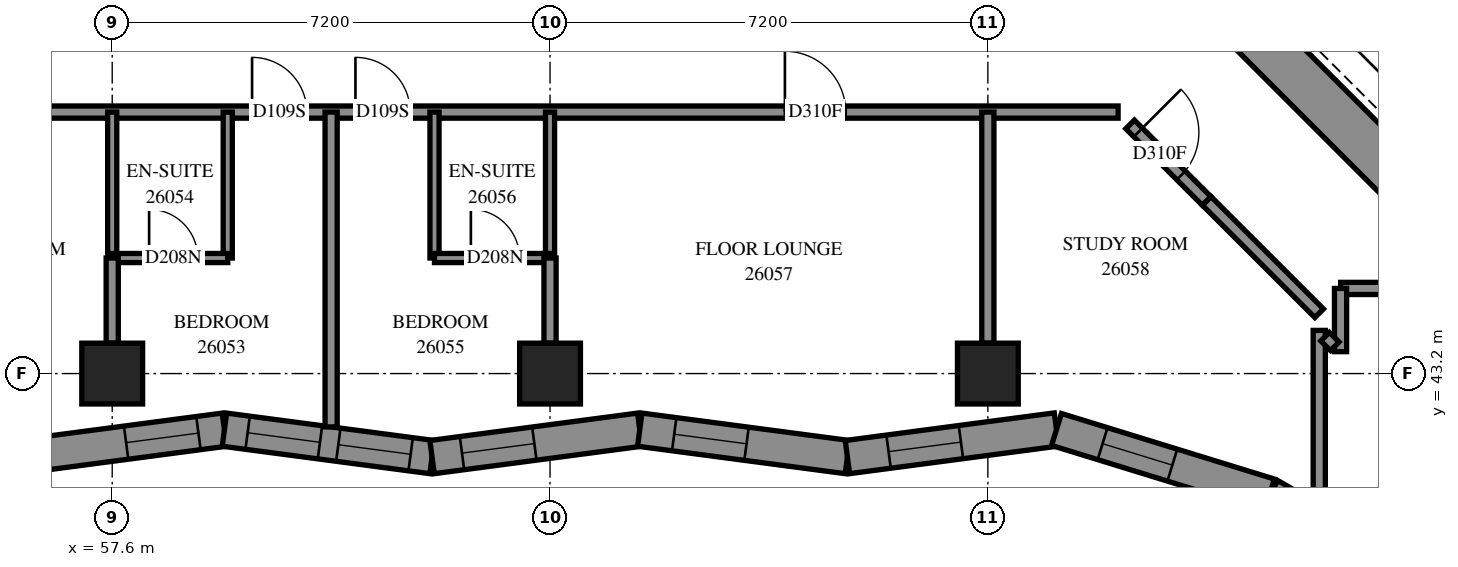
"""IFC4 building model, lengths in metres.
Left out: names, types, materials, properties, quantities, classifications, styles, units other than length and angle.
Written with IfcOpenShell. Run it as: python <this file> out.ifc"""

import sys

from ifc_helpers import new_model, si_unit, direction, frame, frame_2d, origin, origin_2d, place, context, subcontext, project, spatial, polyline, rectangle, outline, extrude, element, fill, save


model = new_model("IFC4")
c1 = context("Model", 3, precision=1e-05, world=origin(), true_north=direction((0.0, 1.0)))
c2 = subcontext(c1, "Body", "Model", "MODEL_VIEW")
j1 = project(units=[si_unit("LENGTHUNIT", "METRE"), si_unit("PLANEANGLEUNIT", "RADIAN")], contexts=[c1])
p1 = place(None, origin())
s1 = spatial("IfcSite", under=j1, at=p1, CompositionType="ELEMENT")
p2 = place(p1, origin())
s2 = spatial("IfcBuilding", under=s1, at=p2, CompositionType="ELEMENT")
p3 = place(p2, frame((0.0, 0.0, 98.2)))
s3 = spatial("IfcBuildingStorey", under=s2, at=p3, CompositionType="ELEMENT", Elevation=98.2)
for number, where, z_axis, x_axis in (
    (1, (57.6, 43.2, 0.0), (0.0, 0.0, 1.0), (1.0, 0.0, 0.0)),
    (2, (64.8, 43.2, 0.0), (0.0, 0.0, 1.0), (1.0, 0.0, 0.0)),
    (3, (72.0, 43.2, 0.0), (0.0, 0.0, 1.0), (1.0, 0.0, 0.0)),
):
    element("IfcColumn", number, at=place(p3, frame(where, z_axis=z_axis, x_axis=x_axis)), inside=s3, PredefinedType="COLUMN", context=c2, shape_type="SweptSolid", body=[
        extrude(rectangle(XDim=1.0, YDim=1.0, at=origin_2d()), origin(), (0.0, 0.0, 1.0), 3.1),
    ])
p4 = place(p3, frame((75.806, 49.373, -0.3), z_axis=(0.0, 0.0, 1.0), x_axis=(0.7071067812, -0.7071067812, 0.0)))
e4 = element("IfcWall", 4, at=p4, inside=s3, PredefinedType="SHEAR", context=c2, shape_type="SweptSolid", body=[
    extrude(rectangle(XDim=16.0, YDim=0.8, at=frame_2d((8.0, 0.0))), origin(), (0.0, 0.0, 1.0), 2.7),
])
p5 = place(p3, frame((56.03, 41.826, 0.0), z_axis=(0.0, 0.0, 1.0), x_axis=(0.9913924297, 0.1309238341, 0.0)))
e5 = element("IfcWall", 5, at=p5, inside=s3, PredefinedType="SOLIDWALL", context=c2, shape_type="SweptSolid", body=[
    extrude(outline(polyline([(-0.036, -0.275), (3.408, -0.275), (3.481, 0.275), (0.036, 0.275), (-0.036, -0.275)])), origin(), (0.0, 0.0, 1.0), 3.1),
])
p6 = place(p5, frame((1.814, 0.0, 0.5)))
e6 = element("IfcOpeningElement", 6, at=p6, cuts=e5, PredefinedType="OPENING", context=c2, shape_type="SweptSolid", body=[
    extrude(rectangle(XDim=1.2, YDim=2.45, at=frame_2d((0.6, 1.225))), frame((0.0, 0.285, 0.0), z_axis=(0.0, -1.0, 0.0), x_axis=(1.0, 0.0, 0.0)), (0.0, 0.0, 1.0), 0.57),
])
p7 = place(p3, frame((59.445, 42.277, 0.0), z_axis=(0.0, 0.0, 1.0), x_axis=(0.9913924297, -0.1309238341, 0.0)))
e7 = element("IfcWall", 7, at=p7, inside=s3, PredefinedType="SOLIDWALL", context=c2, shape_type="SweptSolid", body=[
    extrude(outline(polyline([(0.036, -0.275), (3.481, -0.275), (3.408, 0.275), (-0.036, 0.275), (0.036, -0.275)])), origin(), (0.0, 0.0, 1.0), 3.1),
])
p8 = place(p7, frame((0.385, 0.0, 0.5)))
e8 = element("IfcOpeningElement", 8, at=p8, cuts=e7, PredefinedType="OPENING", context=c2, shape_type="SweptSolid", body=[
    extrude(rectangle(XDim=1.2, YDim=2.45, at=frame_2d((0.6, 1.225))), frame((0.0, 0.285, 0.0), z_axis=(0.0, -1.0, 0.0), x_axis=(1.0, 0.0, 0.0)), (0.0, 0.0, 1.0), 0.57),
])
p9 = place(p7, frame((1.889, 0.0, 0.5)))
e9 = element("IfcOpeningElement", 9, at=p9, cuts=e7, PredefinedType="OPENING", context=c2, shape_type="SweptSolid", body=[
    extrude(rectangle(XDim=1.2, YDim=2.45, at=frame_2d((0.6, 1.225))), frame((0.0, 0.285, 0.0), z_axis=(0.0, -1.0, 0.0), x_axis=(1.0, 0.0, 0.0)), (0.0, 0.0, 1.0), 0.57),
])
p10 = place(p3, frame((62.86, 41.826, 0.0), z_axis=(0.0, 0.0, 1.0), x_axis=(0.9913924297, 0.1309238341, 0.0)))
e10 = element("IfcWall", 10, at=p10, inside=s3, PredefinedType="SOLIDWALL", context=c2, shape_type="SweptSolid", body=[
    extrude(outline(polyline([(-0.036, -0.275), (3.408, -0.275), (3.481, 0.275), (0.036, 0.275), (-0.036, -0.275)])), origin(), (0.0, 0.0, 1.0), 3.1),
])
p11 = place(p10, frame((0.496, 0.0, 0.5)))
e11 = element("IfcOpeningElement", 11, at=p11, cuts=e10, PredefinedType="OPENING", context=c2, shape_type="SweptSolid", body=[
    extrude(rectangle(XDim=1.2, YDim=2.45, at=frame_2d((0.6, 1.225))), frame((0.0, 0.285, 0.0), z_axis=(0.0, -1.0, 0.0), x_axis=(1.0, 0.0, 0.0)), (0.0, 0.0, 1.0), 0.57),
])
p12 = place(p3, frame((66.275, 42.277, 0.0), z_axis=(0.0, 0.0, 1.0), x_axis=(0.9913919321, -0.1309276022, 0.0)))
e12 = element("IfcWall", 12, at=p12, inside=s3, PredefinedType="SOLIDWALL", context=c2, shape_type="SweptSolid", body=[
    extrude(outline(polyline([(0.036, -0.275), (3.481, -0.275), (3.408, 0.275), (-0.036, 0.275), (0.036, -0.275)])), origin(), (0.0, 0.0, 1.0), 3.1),
])
p13 = place(p12, frame((0.572, 0.0, 0.5)))
e13 = element("IfcOpeningElement", 13, at=p13, cuts=e12, PredefinedType="OPENING", context=c2, shape_type="SweptSolid", body=[
    extrude(rectangle(XDim=1.2, YDim=2.45, at=frame_2d((0.6, 1.225))), frame((0.0, 0.285, 0.0), z_axis=(0.0, -1.0, 0.0), x_axis=(1.0, 0.0, 0.0)), (0.0, 0.0, 1.0), 0.57),
])
p14 = place(p3, frame((69.69, 41.826, 0.0), z_axis=(0.0, 0.0, 1.0), x_axis=(0.9913925578, 0.1309228641, 0.0)))
e14 = element("IfcWall", 14, at=p14, inside=s3, PredefinedType="SOLIDWALL", context=c2, shape_type="SweptSolid", body=[
    extrude(outline(polyline([(-0.036, -0.275), (3.408, -0.275), (3.529, 0.275), (0.036, 0.275), (-0.036, -0.275)])), origin(), (0.0, 0.0, 1.0), 3.1),
])
p15 = place(p14, frame((0.683, 0.0, 0.5)))
e15 = element("IfcOpeningElement", 15, at=p15, cuts=e14, PredefinedType="OPENING", context=c2, shape_type="SweptSolid", body=[
    extrude(rectangle(XDim=1.2, YDim=2.45, at=frame_2d((0.6, 1.225))), frame((0.0, 0.285, 0.0), z_axis=(0.0, -1.0, 0.0), x_axis=(1.0, 0.0, 0.0)), (0.0, 0.0, 1.0), 0.57),
])
p16 = place(p3, frame((73.129, 42.281, 0.0), z_axis=(0.0, 0.0, 1.0), x_axis=(0.9557583549, -0.2941529654, 0.0)))
e16 = element("IfcWall", 16, at=p16, inside=s3, PredefinedType="SOLIDWALL", context=c2, shape_type="SweptSolid", body=[
    extrude(outline(polyline([(0.06, -0.275), (3.633, -0.275), (3.696, 0.275), (-0.06, 0.275), (0.06, -0.275)])), origin(), (0.0, 0.0, 1.0), 3.1),
])
p17 = place(p16, frame((0.793, 0.0, 0.5)))
e17 = element("IfcOpeningElement", 17, at=p17, cuts=e16, PredefinedType="OPENING", context=c2, shape_type="SweptSolid", body=[
    extrude(rectangle(XDim=1.2, YDim=2.45, at=frame_2d((0.6, 1.225))), frame((0.0, 0.285, 0.0), z_axis=(0.0, -1.0, 0.0), x_axis=(1.0, 0.0, 0.0)), (0.0, 0.0, 1.0), 0.57),
])
p18 = place(p3, frame((76.631, 41.203, 0.0), z_axis=(0.0, 0.0, 1.0), x_axis=(0.8653939422, -0.501092132, 0.0)))
e18 = element("IfcWall", 18, at=p18, inside=s3, PredefinedType="SOLIDWALL", context=c2, shape_type="SweptSolid", body=[
    extrude(outline(polyline([(0.031, -0.275), (4.111, -0.275), (4.215, 0.275), (-0.031, 0.275), (0.031, -0.275)])), origin(), (0.0, 0.0, 1.0), 3.1),
])
p19 = place(p18, frame((0.348, 0.0, 0.5)))
e19 = element("IfcOpeningElement", 19, at=p19, cuts=e18, PredefinedType="OPENING", context=c2, shape_type="SweptSolid", body=[
    extrude(rectangle(XDim=1.2, YDim=2.45, at=frame_2d((0.6, 1.225))), frame((0.0, 0.285, 0.0), z_axis=(0.0, -1.0, 0.0), x_axis=(1.0, 0.0, 0.0)), (0.0, 0.0, 1.0), 0.57),
])
p20 = place(p18, frame((2.23, 0.0, 0.5)))
e20 = element("IfcOpeningElement", 20, at=p20, cuts=e18, PredefinedType="OPENING", context=c2, shape_type="SweptSolid", body=[
    extrude(rectangle(XDim=1.2, YDim=2.45, at=frame_2d((0.6, 1.225))), frame((0.0, 0.285, 0.0), z_axis=(0.0, -1.0, 0.0), x_axis=(1.0, 0.0, 0.0)), (0.0, 0.0, 1.0), 0.57),
])
p21 = place(p3, frame((54.7, 47.5, 0.0), z_axis=(0.0, 0.0, 1.0), x_axis=(1.0, 0.0, 0.0)))
e21 = element("IfcWall", 21, at=p21, inside=s3, PredefinedType="PARTITIONING", context=c2, shape_type="SweptSolid", body=[
    extrude(rectangle(XDim=19.442, YDim=0.2, at=frame_2d((9.721, 0.0))), origin(), (0.0, 0.0, 1.0), 3.1),
])
p22 = place(p21, frame((5.2, 0.0, 0.0)))
e22 = element("IfcOpeningElement", 22, at=p22, cuts=e21, PredefinedType="OPENING", context=c2, shape_type="SweptSolid", body=[
    extrude(rectangle(XDim=0.9, YDim=2.1, at=frame_2d((0.45, 1.05))), frame((0.0, 0.11, 0.0), z_axis=(0.0, -1.0, 0.0), x_axis=(1.0, 0.0, 0.0)), (0.0, 0.0, 1.0), 0.22),
])
p23 = place(p21, frame((6.9, 0.0, 0.0)))
e23 = element("IfcOpeningElement", 23, at=p23, cuts=e21, PredefinedType="OPENING", context=c2, shape_type="SweptSolid", body=[
    extrude(rectangle(XDim=0.9, YDim=2.1, at=frame_2d((0.45, 1.05))), frame((0.0, 0.11, 0.0), z_axis=(0.0, -1.0, 0.0), x_axis=(1.0, 0.0, 0.0)), (0.0, 0.0, 1.0), 0.22),
])
p24 = place(p21, frame((13.963, 0.0, 0.0)))
e24 = element("IfcOpeningElement", 24, at=p24, cuts=e21, PredefinedType="OPENING", context=c2, shape_type="SweptSolid", body=[
    extrude(rectangle(XDim=1.0, YDim=2.1, at=frame_2d((0.5, 1.05))), frame((0.0, 0.11, 0.0), z_axis=(0.0, -1.0, 0.0), x_axis=(1.0, 0.0, 0.0)), (0.0, 0.0, 1.0), 0.22),
])
p25 = place(p3, frame((61.2, 42.323, 0.0), z_axis=(0.0, 0.0, 1.0), x_axis=(0.0, 1.0, 0.0)))
e25 = element("IfcWall", 25, at=p25, inside=s3, PredefinedType="PARTITIONING", context=c2, shape_type="SweptSolid", body=[
    extrude(rectangle(XDim=5.177, YDim=0.2, at=frame_2d((2.588, 0.0))), origin(), (0.0, 0.0, 1.0), 3.1),
])
p26 = place(p3, frame((72.0, 43.7, 0.0), z_axis=(0.0, 0.0, 1.0), x_axis=(0.0, 1.0, 0.0)))
e26 = element("IfcWall", 26, at=p26, inside=s3, PredefinedType="PARTITIONING", context=c2, shape_type="SweptSolid", body=[
    extrude(rectangle(XDim=3.8, YDim=0.2, at=frame_2d((1.9, 0.0))), origin(), (0.0, 0.0, 1.0), 3.1),
])
p27 = place(p3, frame((77.45, 41.046, 0.0), z_axis=(0.0, 0.0, 1.0), x_axis=(0.0, 1.0, 0.0)))
e27 = element("IfcWall", 27, at=p27, inside=s3, PredefinedType="PARTITIONING", context=c2, shape_type="SweptSolid", body=[
    extrude(rectangle(XDim=2.864, YDim=0.2, at=frame_2d((1.432, 0.0))), origin(), (0.0, 0.0, 1.0), 3.1),
])
p28 = place(p3, frame((75.598, 46.04, 0.0), z_axis=(0.0, 0.0, 1.0), x_axis=(0.7074891043, -0.7067242512, 0.0)))
e28 = element("IfcWall", 28, at=p28, inside=s3, PredefinedType="PARTITIONING", context=c2, shape_type="SweptSolid", body=[
    extrude(rectangle(XDim=2.615, YDim=0.2, at=frame_2d((1.308, 0.0))), origin(), (0.0, 0.0, 1.0), 3.1),
])
for number, where, z_axis, x_axis in (
    (29, (59.5, 45.1, 0.0), (0.0, 0.0, 1.0), (0.0, 1.0, 0.0)),
    (30, (57.6, 45.1, 0.0), (0.0, 0.0, 1.0), (0.0, 1.0, 0.0)),
    (31, (62.9, 45.1, 0.0), (0.0, 0.0, 1.0), (0.0, 1.0, 0.0)),
    (32, (64.8, 45.1, 0.0), (0.0, 0.0, 1.0), (0.0, 1.0, 0.0)),
):
    element("IfcWall", number, at=place(p3, frame(where, z_axis=z_axis, x_axis=x_axis)), inside=s3, PredefinedType="PARTITIONING", context=c2, shape_type="SweptSolid", body=[
        extrude(rectangle(XDim=2.4, YDim=0.15, at=frame_2d((1.2, 0.0))), origin(), (0.0, 0.0, 1.0), 3.1),
    ])
p29 = place(p3, frame((77.802, 44.6, 0.0), z_axis=(0.0, 0.0, 1.0), x_axis=(1.0, 0.0, 0.0)))
e33 = element("IfcWall", 33, at=p29, inside=s3, PredefinedType="PARTITIONING", context=c2, shape_type="SweptSolid", body=[
    extrude(rectangle(XDim=2.098, YDim=0.2, at=frame_2d((1.049, 0.0))), origin(), (0.0, 0.0, 1.0), 3.1),
])
p30 = place(p3, frame((57.6, 45.1, 0.0), z_axis=(0.0, 0.0, 1.0), x_axis=(1.0, 0.0, 0.0)))
e34 = element("IfcWall", 34, at=p30, inside=s3, PredefinedType="PARTITIONING", context=c2, shape_type="SweptSolid", body=[
    extrude(rectangle(XDim=1.9, YDim=0.15, at=frame_2d((0.95, 0.0))), origin(), (0.0, 0.0, 1.0), 3.1),
])
p31 = place(p30, frame((0.607, 0.0, 0.0)))
e35 = element("IfcOpeningElement", 35, at=p31, cuts=e34, PredefinedType="OPENING", context=c2, shape_type="SweptSolid", body=[
    extrude(rectangle(XDim=0.8, YDim=2.1, at=frame_2d((0.4, 1.05))), frame((0.0, 0.085, 0.0), z_axis=(0.0, -1.0, 0.0), x_axis=(1.0, 0.0, 0.0)), (0.0, 0.0, 1.0), 0.17),
])
p32 = place(p3, frame((62.9, 45.1, 0.0), z_axis=(0.0, 0.0, 1.0), x_axis=(1.0, 0.0, 0.0)))
e36 = element("IfcWall", 36, at=p32, inside=s3, PredefinedType="PARTITIONING", context=c2, shape_type="SweptSolid", body=[
    extrude(rectangle(XDim=1.9, YDim=0.15, at=frame_2d((0.95, 0.0))), origin(), (0.0, 0.0, 1.0), 3.1),
])
p33 = place(p32, frame((0.598, 0.0, 0.0)))
e37 = element("IfcOpeningElement", 37, at=p33, cuts=e36, PredefinedType="OPENING", context=c2, shape_type="SweptSolid", body=[
    extrude(rectangle(XDim=0.8, YDim=2.1, at=frame_2d((0.4, 1.05))), frame((0.0, 0.085, 0.0), z_axis=(0.0, -1.0, 0.0), x_axis=(1.0, 0.0, 0.0)), (0.0, 0.0, 1.0), 0.17),
])
p34 = place(p3, frame((74.339, 47.297, 0.0), z_axis=(0.0, 0.0, 1.0), x_axis=(0.7071067812, -0.7071067812, 0.0)))
e38 = element("IfcWall", 38, at=p34, inside=s3, PredefinedType="PARTITIONING", context=c2, shape_type="SweptSolid", body=[
    extrude(rectangle(XDim=1.779, YDim=0.2, at=frame_2d((0.889, 0.0))), origin(), (0.0, 0.0, 1.0), 3.1),
])
p35 = place(p34, frame((0.186, 0.0, 0.0)))
e39 = element("IfcOpeningElement", 39, at=p35, cuts=e38, PredefinedType="OPENING", context=c2, shape_type="SweptSolid", body=[
    extrude(rectangle(XDim=1.0, YDim=2.1, at=frame_2d((0.5, 1.05))), frame((0.0, 0.11, 0.0), z_axis=(0.0, -1.0, 0.0), x_axis=(1.0, 0.0, 0.0)), (0.0, 0.0, 1.0), 0.22),
])
for number, where, z_axis, x_axis in (
    (40, (57.6, 43.7, 0.0), (0.0, 0.0, 1.0), (0.0, 1.0, 0.0)),
    (41, (64.8, 43.7, 0.0), (0.0, 0.0, 1.0), (0.0, 1.0, 0.0)),
):
    element("IfcWall", number, at=place(p3, frame(where, z_axis=z_axis, x_axis=x_axis)), inside=s3, PredefinedType="PARTITIONING", context=c2, shape_type="SweptSolid", body=[
        extrude(rectangle(XDim=1.4, YDim=0.2, at=frame_2d((0.7, 0.0))), origin(), (0.0, 0.0, 1.0), 3.1),
    ])
p36 = place(p3, frame((78.3, 40.554, 0.0), z_axis=(0.0, 0.0, 1.0), x_axis=(0.7071462414, 0.7070673188, 0.0)))
e42 = element("IfcWall", 42, at=p36, inside=s3, PredefinedType="PARTITIONING", context=c2, shape_type="SweptSolid", body=[
    extrude(rectangle(XDim=1.267, YDim=0.2, at=frame_2d((0.633, 0.0))), origin(), (0.0, 0.0, 1.0), 3.1),
])
p37 = place(p3, frame((77.8, 43.56, 0.0), z_axis=(0.0, 0.0, 1.0), x_axis=(0.0, 1.0, 0.0)))
e43 = element("IfcWall", 43, at=p37, inside=s3, PredefinedType="PARTITIONING", context=c2, shape_type="SweptSolid", body=[
    extrude(rectangle(XDim=1.04, YDim=0.2, at=frame_2d((0.52, 0.0))), origin(), (0.0, 0.0, 1.0), 3.1),
])
p38 = place(p3, frame((77.546, 43.808, 0.0), z_axis=(0.0, 0.0, 1.0), x_axis=(0.707329037, -0.7068844555, 0.0)))
e44 = element("IfcWall", 44, at=p38, inside=s3, PredefinedType="PARTITIONING", context=c2, shape_type="SweptSolid", body=[
    extrude(rectangle(XDim=0.225, YDim=0.2, at=frame_2d((0.112, 0.0))), origin(), (0.0, 0.0, 1.0), 3.1),
])
p39 = place(p6, origin())
e45 = element("IfcWindow", 45, at=p39, inside=s3, PartitioningType="SINGLE_PANEL", PredefinedType="WINDOW", context=c2, shape_type="SweptSolid", body=[
    extrude(rectangle(XDim=1.2, YDim=2.45, at=frame_2d((0.6, 1.225))), frame((0.0, 0.155, 0.0), z_axis=(0.0, -1.0, 0.0), x_axis=(1.0, 0.0, 0.0)), (0.0, 0.0, 1.0), 0.06),
])
fill(e6, e45)
p40 = place(p8, origin())
e46 = element("IfcWindow", 46, at=p40, inside=s3, PartitioningType="SINGLE_PANEL", PredefinedType="WINDOW", context=c2, shape_type="SweptSolid", body=[
    extrude(rectangle(XDim=1.2, YDim=2.45, at=frame_2d((0.6, 1.225))), frame((0.0, 0.155, 0.0), z_axis=(0.0, -1.0, 0.0), x_axis=(1.0, 0.0, 0.0)), (0.0, 0.0, 1.0), 0.06),
])
fill(e8, e46)
p41 = place(p9, origin())
e47 = element("IfcWindow", 47, at=p41, inside=s3, PartitioningType="SINGLE_PANEL", PredefinedType="WINDOW", context=c2, shape_type="SweptSolid", body=[
    extrude(rectangle(XDim=1.2, YDim=2.45, at=frame_2d((0.6, 1.225))), frame((0.0, 0.155, 0.0), z_axis=(0.0, -1.0, 0.0), x_axis=(1.0, 0.0, 0.0)), (0.0, 0.0, 1.0), 0.06),
])
fill(e9, e47)
p42 = place(p11, origin())
e48 = element("IfcWindow", 48, at=p42, inside=s3, PartitioningType="SINGLE_PANEL", PredefinedType="WINDOW", context=c2, shape_type="SweptSolid", body=[
    extrude(rectangle(XDim=1.2, YDim=2.45, at=frame_2d((0.6, 1.225))), frame((0.0, 0.155, 0.0), z_axis=(0.0, -1.0, 0.0), x_axis=(1.0, 0.0, 0.0)), (0.0, 0.0, 1.0), 0.06),
])
fill(e11, e48)
p43 = place(p13, origin())
e49 = element("IfcWindow", 49, at=p43, inside=s3, PartitioningType="SINGLE_PANEL", PredefinedType="WINDOW", context=c2, shape_type="SweptSolid", body=[
    extrude(rectangle(XDim=1.2, YDim=2.45, at=frame_2d((0.6, 1.225))), frame((0.0, 0.155, 0.0), z_axis=(0.0, -1.0, 0.0), x_axis=(1.0, 0.0, 0.0)), (0.0, 0.0, 1.0), 0.06),
])
fill(e13, e49)
p44 = place(p15, origin())
e50 = element("IfcWindow", 50, at=p44, inside=s3, PartitioningType="SINGLE_PANEL", PredefinedType="WINDOW", context=c2, shape_type="SweptSolid", body=[
    extrude(rectangle(XDim=1.2, YDim=2.45, at=frame_2d((0.6, 1.225))), frame((0.0, 0.155, 0.0), z_axis=(0.0, -1.0, 0.0), x_axis=(1.0, 0.0, 0.0)), (0.0, 0.0, 1.0), 0.06),
])
fill(e15, e50)
p45 = place(p17, origin())
e51 = element("IfcWindow", 51, at=p45, inside=s3, PartitioningType="SINGLE_PANEL", PredefinedType="WINDOW", context=c2, shape_type="SweptSolid", body=[
    extrude(rectangle(XDim=1.2, YDim=2.45, at=frame_2d((0.6, 1.225))), frame((0.0, 0.155, 0.0), z_axis=(0.0, -1.0, 0.0), x_axis=(1.0, 0.0, 0.0)), (0.0, 0.0, 1.0), 0.06),
])
fill(e17, e51)
p46 = place(p22, origin())
e52 = element("IfcDoor", 52, at=p46, inside=s3, OperationType="SINGLE_SWING_LEFT", PredefinedType="DOOR", context=c2, shape_type="SweptSolid", body=[
    extrude(rectangle(XDim=0.9, YDim=2.1, at=frame_2d((0.45, 1.05))), frame((0.0, 0.025, 0.0), z_axis=(0.0, -1.0, 0.0), x_axis=(1.0, 0.0, 0.0)), (0.0, 0.0, 1.0), 0.05),
])
fill(e22, e52)
p47 = place(p31, origin())
e53 = element("IfcDoor", 53, at=p47, inside=s3, OperationType="SINGLE_SWING_RIGHT", PredefinedType="DOOR", context=c2, shape_type="SweptSolid", body=[
    extrude(rectangle(XDim=0.8, YDim=2.1, at=frame_2d((0.4, 1.05))), frame((0.0, 0.025, 0.0), z_axis=(0.0, -1.0, 0.0), x_axis=(1.0, 0.0, 0.0)), (0.0, 0.0, 1.0), 0.05),
])
fill(e35, e53)
p48 = place(p23, origin())
e54 = element("IfcDoor", 54, at=p48, inside=s3, OperationType="SINGLE_SWING_RIGHT", PredefinedType="DOOR", context=c2, shape_type="SweptSolid", body=[
    extrude(rectangle(XDim=0.9, YDim=2.1, at=frame_2d((0.45, 1.05))), frame((0.0, 0.025, 0.0), z_axis=(0.0, -1.0, 0.0), x_axis=(1.0, 0.0, 0.0)), (0.0, 0.0, 1.0), 0.05),
])
fill(e23, e54)
p49 = place(p33, origin())
e55 = element("IfcDoor", 55, at=p49, inside=s3, OperationType="SINGLE_SWING_RIGHT", PredefinedType="DOOR", context=c2, shape_type="SweptSolid", body=[
    extrude(rectangle(XDim=0.8, YDim=2.1, at=frame_2d((0.4, 1.05))), frame((0.0, 0.025, 0.0), z_axis=(0.0, -1.0, 0.0), x_axis=(1.0, 0.0, 0.0)), (0.0, 0.0, 1.0), 0.05),
])
fill(e37, e55)
p50 = place(p24, origin())
e56 = element("IfcDoor", 56, at=p50, inside=s3, OperationType="SINGLE_SWING_LEFT", PredefinedType="DOOR", context=c2, shape_type="SweptSolid", body=[
    extrude(rectangle(XDim=1.0, YDim=2.1, at=frame_2d((0.5, 1.05))), frame((0.0, 0.025, 0.0), z_axis=(0.0, -1.0, 0.0), x_axis=(1.0, 0.0, 0.0)), (0.0, 0.0, 1.0), 0.05),
])
fill(e24, e56)
p51 = place(p35, origin())
e57 = element("IfcDoor", 57, at=p51, inside=s3, OperationType="SINGLE_SWING_LEFT", PredefinedType="DOOR", context=c2, shape_type="SweptSolid", body=[
    extrude(rectangle(XDim=1.0, YDim=2.1, at=frame_2d((0.5, 1.05))), frame((0.0, 0.025, 0.0), z_axis=(0.0, -1.0, 0.0), x_axis=(1.0, 0.0, 0.0)), (0.0, 0.0, 1.0), 0.05),
])
fill(e39, e57)
save(model, sys.argv[1])
